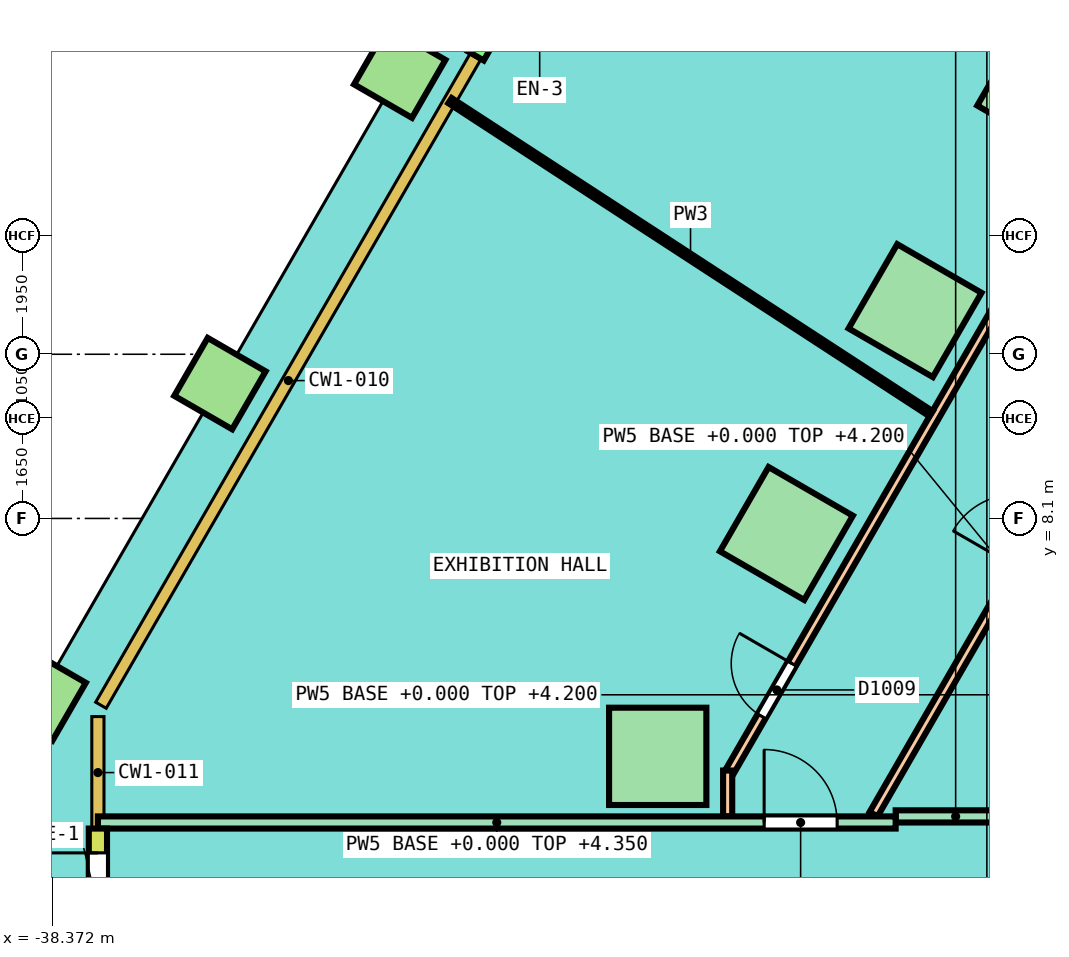
"""IFC4 building model, lengths in metres.
Left out: names, types, materials, properties, quantities, classifications, styles, units other than length and angle.
Written with IfcOpenShell. Run it as: python <this file> out.ifc"""

import sys

from ifc_helpers import new_model, si_unit, direction, frame, frame_2d, origin, origin_2d, place, context, subcontext, project, spatial, rectangle, extrude, element, fill, save


model = new_model("IFC4")
c1 = context("Model", 3, precision=1e-05, world=origin(), true_north=direction((0.0, 1.0)))
c2 = subcontext(c1, "Body", "Model", "MODEL_VIEW")
j1 = project(units=[si_unit("LENGTHUNIT", "METRE"), si_unit("PLANEANGLEUNIT", "RADIAN")], contexts=[c1])
p1 = place(None, origin())
s1 = spatial("IfcSite", under=j1, at=p1, CompositionType="ELEMENT")
p2 = place(p1, origin())
s2 = spatial("IfcBuilding", under=s1, at=p2, CompositionType="ELEMENT")
p3 = place(p2, origin())
s3 = spatial("IfcBuildingStorey", under=s2, at=p3, CompositionType="ELEMENT", Elevation=0.0)
for number, where, z_axis, x_axis in (
    (1, (-22.065, 15.183, 0.0), (0.0, 0.0, 1.0), (-0.5, -0.866, 0.0)),
    (2, (-24.181, 11.518, 0.0), (0.0, 0.0, 1.0), (-0.5, -0.866, 0.0)),
    (3, (-26.297, 7.853, 0.0), (0.0, 0.0, 1.0), (-0.5, -0.866, 0.0)),
    (4, (-28.413, 4.188, 0.0), (0.0, 0.0, 1.0), (0.0, -1.0, 0.0)),
):
    element("IfcColumn", number, at=place(p3, frame(where, z_axis=z_axis, x_axis=x_axis)), inside=s3, PredefinedType="COLUMN", context=c2, shape_type="SweptSolid", body=[
        extrude(rectangle(XDim=1.6, YDim=1.6, at=origin_2d()), origin(), (0.0, 0.0, 1.0), 5.25),
    ])
for number, where, z_axis, x_axis in (
    (5, (-32.656, 15.439, -0.35), (0.0, 0.0, 1.0), (-0.5, -0.866, 0.0)),
    (6, (-35.612, 10.318, -0.35), (0.0, 0.0, 1.0), (-0.5, -0.866, 0.0)),
    (7, (-38.569, 5.196, -0.35), (0.0, 0.0, 1.0), (-0.5, -0.866, 0.0)),
):
    element("IfcColumn", number, at=place(p3, frame(where, z_axis=z_axis, x_axis=x_axis)), inside=s3, PredefinedType="COLUMN", context=c2, shape_type="SweptSolid", body=[
        extrude(rectangle(XDim=1.1, YDim=1.1, at=origin_2d()), origin(), (0.0, 0.0, 1.0), 5.6),
    ])
p4 = place(p3, frame((-29.304, 19.344, 0.0), z_axis=(0.0, 0.0, 1.0), x_axis=(-0.500002543286, -0.866023935413, 0.0)))
e8 = element("IfcWall", 8, at=p4, inside=s3, PredefinedType="SOLIDWALL", context=c2, shape_type="SweptSolid", body=[
    extrude(rectangle(XDim=4.2, YDim=0.3, at=frame_2d((2.1, 0.0))), origin(), (0.0, 0.0, 1.0), 5.25),
])
p5 = place(p4, frame((0.9, 0.0, 0.0)))
e9 = element("IfcOpeningElement", 9, at=p5, cuts=e8, PredefinedType="OPENING", context=c2, shape_type="SweptSolid", body=[
    extrude(rectangle(XDim=2.4, YDim=3.0, at=frame_2d((1.2, 1.5))), frame((0.0, 0.16, 0.0), z_axis=(0.0, -1.0, 0.0), x_axis=(1.0, 0.0, 0.0)), (0.0, 0.0, 1.0), 0.32),
])
p6 = place(p3, frame((-37.619, 3.0, 0.0), z_axis=(0.0, 0.0, 1.0), x_axis=(0.0, -1.0, 0.0)))
e10 = element("IfcWall", 10, at=p6, inside=s3, PredefinedType="SOLIDWALL", context=c2, shape_type="SweptSolid", body=[
    extrude(rectangle(XDim=6.0, YDim=0.3, at=frame_2d((3.0, 0.0))), origin(), (0.0, 0.0, 1.0), 5.25),
])
p7 = place(p6, frame((0.4, 0.0, 0.0)))
e11 = element("IfcOpeningElement", 11, at=p7, cuts=e10, PredefinedType="OPENING", context=c2, shape_type="SweptSolid", body=[
    extrude(rectangle(XDim=1.8, YDim=2.4, at=frame_2d((0.9, 1.2))), frame((0.0, 0.16, 0.0), z_axis=(0.0, -1.0, 0.0), x_axis=(1.0, 0.0, 0.0)), (0.0, 0.0, 1.0), 0.32),
])
p8 = place(p6, frame((3.8, 0.0, 0.0)))
e12 = element("IfcOpeningElement", 12, at=p8, cuts=e10, PredefinedType="OPENING", context=c2, shape_type="SweptSolid", body=[
    extrude(rectangle(XDim=1.8, YDim=2.4, at=frame_2d((0.9, 1.2))), frame((0.0, 0.16, 0.0), z_axis=(0.0, -1.0, 0.0), x_axis=(1.0, 0.0, 0.0)), (0.0, 0.0, 1.0), 0.32),
])
p9 = place(p3, frame((-27.225, 3.944, 0.0), z_axis=(0.0, 0.0, 1.0), x_axis=(0.499999139641, 0.866025900512, 0.0)))
e13 = element("IfcWall", 13, at=p9, inside=s3, PredefinedType="PARTITIONING", context=c2, shape_type="SweptSolid", body=[
    extrude(rectangle(XDim=20.394, YDim=0.15, at=frame_2d((10.197, 0.0))), origin(), (0.0, 0.0, 1.0), 4.2),
])
p10 = place(p9, frame((1.042, 0.0, 0.0)))
e14 = element("IfcOpeningElement", 14, at=p10, cuts=e13, PredefinedType="OPENING", context=c2, shape_type="SweptSolid", body=[
    extrude(rectangle(XDim=1.0, YDim=2.1, at=frame_2d((0.5, 1.05))), frame((0.0, 0.085, 0.0), z_axis=(0.0, -1.0, 0.0), x_axis=(1.0, 0.0, 0.0)), (0.0, 0.0, 1.0), 0.17),
])
p11 = place(p3, frame((-24.863, 3.236, 0.0), z_axis=(0.0, 0.0, 1.0), x_axis=(0.499996476014, 0.866027438349, 0.0)))
e15 = element("IfcWall", 15, at=p11, inside=s3, PredefinedType="PARTITIONING", context=c2, shape_type="SweptSolid", body=[
    extrude(rectangle(XDim=19.332, YDim=0.15, at=frame_2d((9.666, 0.0))), origin(), (0.0, 0.0, 1.0), 4.2),
])
p12 = place(p11, frame((4.689, 0.0, 0.0)))
e16 = element("IfcOpeningElement", 16, at=p12, cuts=e15, PredefinedType="OPENING", context=c2, shape_type="SweptSolid", body=[
    extrude(rectangle(XDim=1.2, YDim=2.1, at=frame_2d((0.6, 1.05))), frame((0.0, 0.085, 0.0), z_axis=(0.0, -1.0, 0.0), x_axis=(1.0, 0.0, 0.0)), (0.0, 0.0, 1.0), 0.17),
])
p13 = place(p3, frame((-27.263, 3.2, 0.0), z_axis=(0.0, 0.0, 1.0), x_axis=(0.0, 1.0, 0.0)))
e17 = element("IfcWall", 17, at=p13, inside=s3, PredefinedType="PARTITIONING", context=c2, shape_type="SweptSolid", body=[
    extrude(rectangle(XDim=0.754, YDim=0.15, at=frame_2d((0.377, 0.0))), origin(), (0.0, 0.0, 1.0), 4.2),
])
p14 = place(p3, frame((-24.5, 3.2, 0.0), z_axis=(0.0, 0.0, 1.0), x_axis=(1.0, 0.0, 0.0)))
e18 = element("IfcWall", 18, at=p14, inside=s3, PredefinedType="PARTITIONING", context=c2, shape_type="SweptSolid", body=[
    extrude(rectangle(XDim=1.973, YDim=0.2, at=frame_2d((0.987, 0.0))), origin(), (0.0, 0.0, 1.0), 4.2),
])
p15 = place(p3, frame((-37.619, 3.1, 0.0), z_axis=(0.0, 0.0, 1.0), x_axis=(1.0, 0.0, 0.0)))
e19 = element("IfcWall", 19, at=p15, inside=s3, PredefinedType="PARTITIONING", context=c2, shape_type="SweptSolid", body=[
    extrude(rectangle(XDim=13.119, YDim=0.2, at=frame_2d((6.56, 0.0))), origin(), (0.0, 0.0, 1.0), 4.35),
])
p16 = place(p15, frame((10.956, 0.0, 0.0)))
e20 = element("IfcOpeningElement", 20, at=p16, cuts=e19, PredefinedType="OPENING", context=c2, shape_type="SweptSolid", body=[
    extrude(rectangle(XDim=1.2, YDim=2.1, at=frame_2d((0.6, 1.05))), frame((0.0, 0.11, 0.0), z_axis=(0.0, -1.0, 0.0), x_axis=(1.0, 0.0, 0.0)), (0.0, 0.0, 1.0), 0.22),
])
p17 = place(p3, frame((-31.829, 14.971, 0.0), z_axis=(0.0, 0.0, 1.0), x_axis=(0.838096546027, -0.545521933141, 0.0)))
e21 = element("IfcWall", 21, at=p17, inside=s3, PredefinedType="PARTITIONING", context=c2, shape_type="SweptSolid", body=[
    extrude(rectangle(XDim=9.438, YDim=0.1, at=frame_2d((4.719, 0.0))), origin(), (0.0, 0.0, 1.0), 4.35),
])
p18 = place(p7, origin())
e22 = element("IfcDoor", 22, at=p18, inside=s3, OperationType="DOUBLE_DOOR_SINGLE_SWING", PredefinedType="DOOR", context=c2, shape_type="SweptSolid", body=[
    extrude(rectangle(XDim=1.8, YDim=2.4, at=frame_2d((0.9, 1.2))), frame((0.0, 0.025, 0.0), z_axis=(0.0, -1.0, 0.0), x_axis=(1.0, 0.0, 0.0)), (0.0, 0.0, 1.0), 0.05),
])
fill(e11, e22)
p19 = place(p10, origin())
e23 = element("IfcDoor", 23, at=p19, inside=s3, OperationType="SINGLE_SWING_RIGHT", PredefinedType="DOOR", context=c2, shape_type="SweptSolid", body=[
    extrude(rectangle(XDim=1.0, YDim=2.1, at=frame_2d((0.5, 1.05))), frame((0.0, 0.025, 0.0), z_axis=(0.0, -1.0, 0.0), x_axis=(1.0, 0.0, 0.0)), (0.0, 0.0, 1.0), 0.05),
])
fill(e14, e23)
p20 = place(p16, origin())
e24 = element("IfcDoor", 24, at=p20, inside=s3, OperationType="SINGLE_SWING_LEFT", PredefinedType="DOOR", context=c2, shape_type="SweptSolid", body=[
    extrude(rectangle(XDim=1.2, YDim=2.1, at=frame_2d((0.6, 1.05))), frame((0.0, 0.025, 0.0), z_axis=(0.0, -1.0, 0.0), x_axis=(1.0, 0.0, 0.0)), (0.0, 0.0, 1.0), 0.05),
])
fill(e20, e24)
save(model, sys.argv[1])
